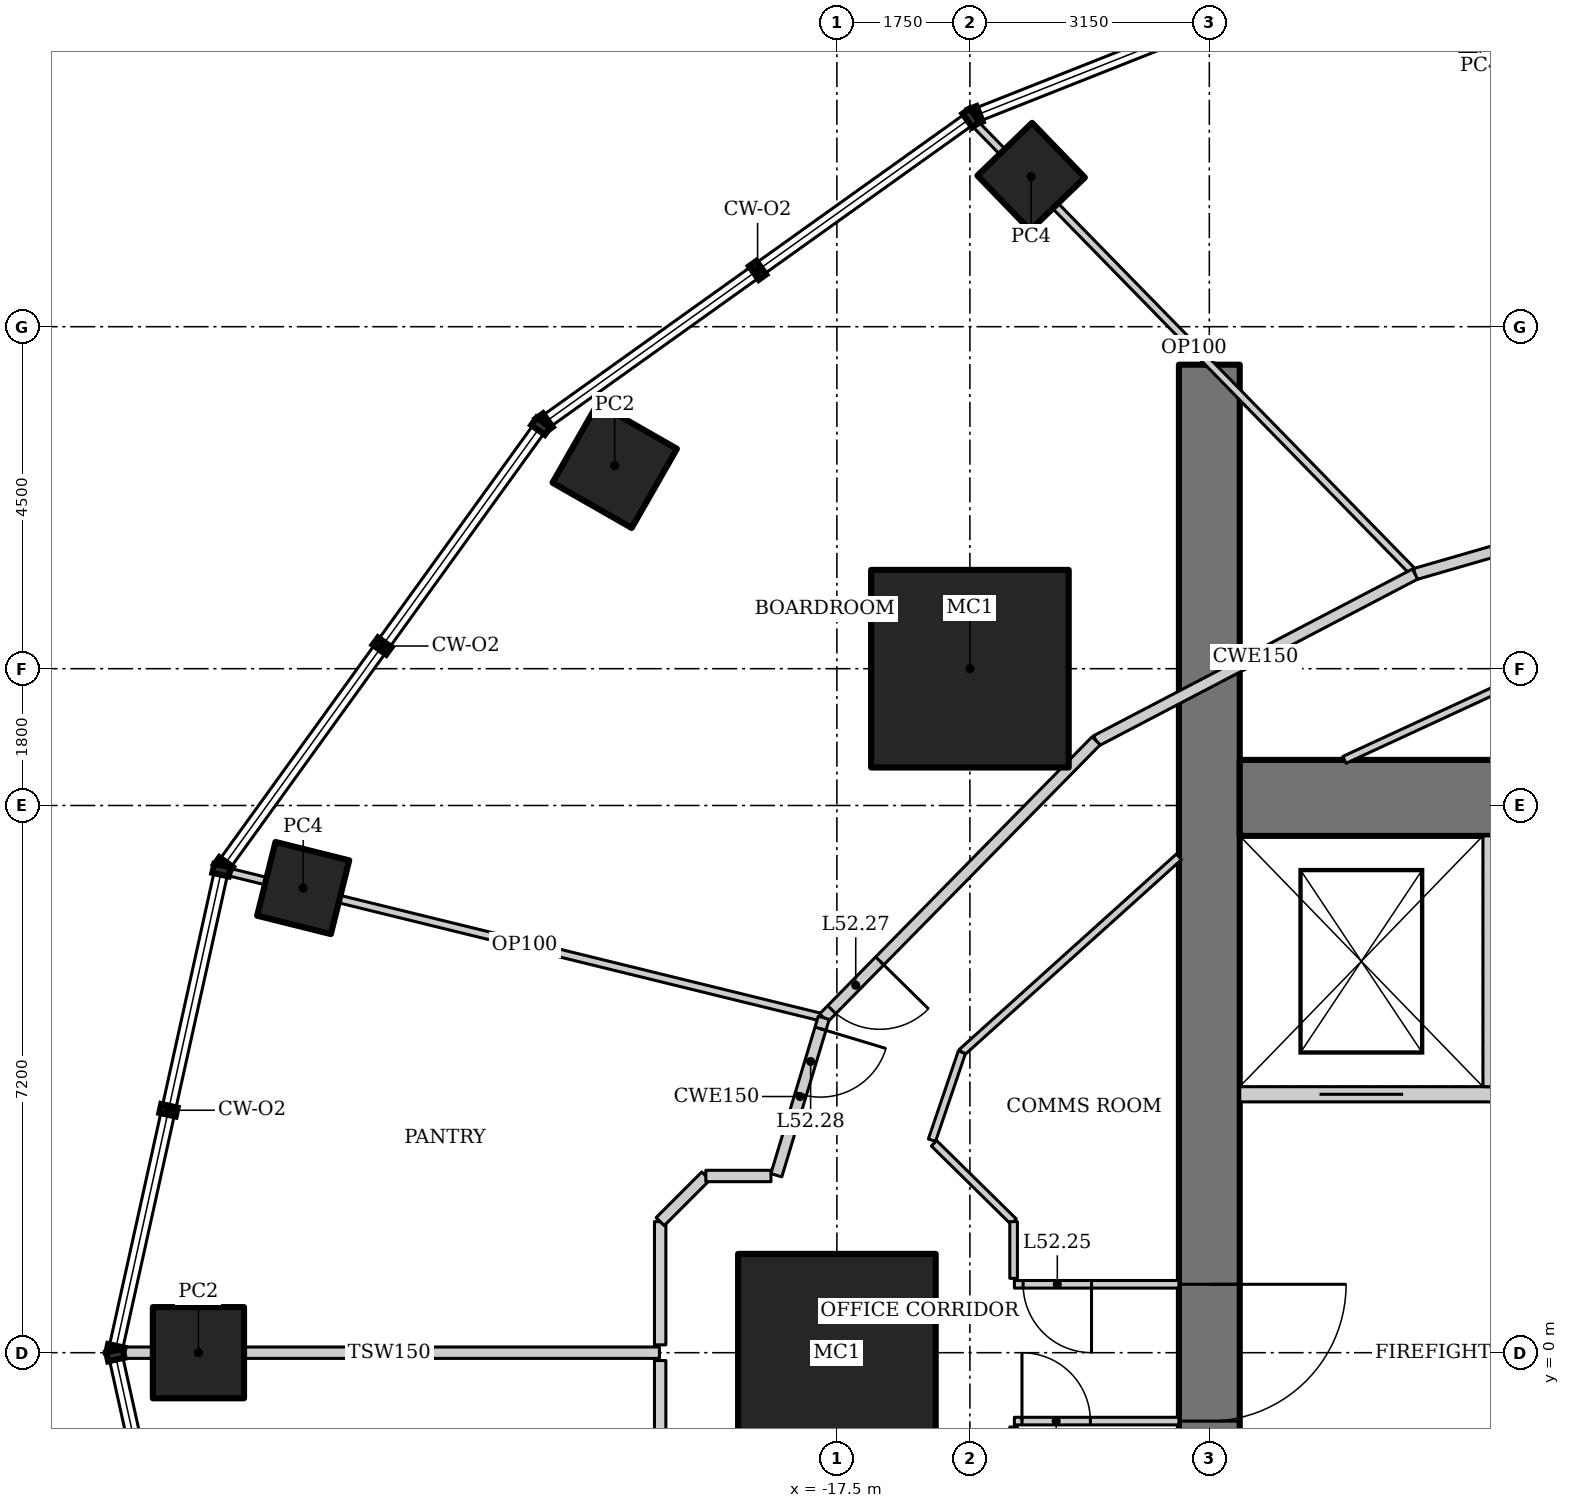
"""IFC4 building model, lengths in metres.
Left out: names, types, materials, properties, quantities, classifications, styles, units other than length and angle.
Written with IfcOpenShell. Run it as: python <this file> out.ifc"""

import sys

from ifc_helpers import new_model, si_unit, direction, frame, frame_2d, origin, origin_2d, place, context, subcontext, project, spatial, rectangle, hollow_rectangle, extrude, element, fill, save


model = new_model("IFC4")
c1 = context("Model", 3, precision=1e-05, world=origin(), true_north=direction((0.0, 1.0)))
c2 = subcontext(c1, "Body", "Model", "MODEL_VIEW")
j1 = project(units=[si_unit("LENGTHUNIT", "METRE"), si_unit("PLANEANGLEUNIT", "RADIAN")], contexts=[c1])
p1 = place(None, origin())
s1 = spatial("IfcSite", under=j1, at=p1, CompositionType="ELEMENT")
p2 = place(p1, origin())
s2 = spatial("IfcBuilding", under=s1, at=p2, CompositionType="ELEMENT")
p3 = place(p2, frame((0.0, 0.0, 224.2)))
s3 = spatial("IfcBuildingStorey", under=s2, at=p3, CompositionType="ELEMENT", Elevation=224.2)
for number, where, z_axis, x_axis in (
    (1, (-15.75, 9.0, 0.0), (0.0, 0.0, 1.0), (1.0, 0.0, 0.0)),
    (2, (-17.5, 0.0, 0.0), (0.0, 0.0, 1.0), (1.0, 0.0, 0.0)),
):
    element("IfcColumn", number, at=place(p3, frame(where, z_axis=z_axis, x_axis=x_axis)), inside=s3, PredefinedType="COLUMN", context=c2, shape_type="SweptSolid", body=[
        extrude(hollow_rectangle(XDim=2.6, YDim=2.6, WallThickness=0.13, at=origin_2d()), origin(), (0.0, 0.0, 1.0), 4.2),
    ])
for number, where, z_axis, x_axis in (
    (3, (-9.035, 17.731, 0.0), (0.0, 0.0, 1.0), (0.891, 0.454, 0.0)),
    (4, (-14.944, 15.475, 0.0), (0.0, 0.0, 1.0), (0.719, 0.695, 0.0)),
):
    element("IfcColumn", number, at=place(p3, frame(where, z_axis=z_axis, x_axis=x_axis)), inside=s3, PredefinedType="COLUMN", context=c2, shape_type="SweptSolid", body=[
        extrude(hollow_rectangle(XDim=1.0, YDim=1.0, WallThickness=0.08, at=origin_2d()), origin(), (0.0, 0.0, 1.0), 4.2),
    ])
p4 = place(p3, frame((-20.423, 11.67, 0.0), z_axis=(0.0, 0.0, 1.0), x_axis=(0.496139221777, 0.86824298017, 0.0)))
e5 = element("IfcColumn", 5, at=p4, inside=s3, PredefinedType="COLUMN", context=c2, shape_type="SweptSolid", body=[
    extrude(hollow_rectangle(XDim=1.2, YDim=1.2, WallThickness=0.1, at=origin_2d()), origin(), (0.0, 0.0, 1.0), 4.2),
])
p5 = place(p3, frame((-24.522, 6.114, 0.0), z_axis=(0.0, 0.0, 1.0), x_axis=(0.2419218956, 0.970295726276, 0.0)))
e6 = element("IfcColumn", 6, at=p5, inside=s3, PredefinedType="COLUMN", context=c2, shape_type="SweptSolid", body=[
    extrude(hollow_rectangle(XDim=1.0, YDim=1.0, WallThickness=0.08, at=origin_2d()), origin(), (0.0, 0.0, 1.0), 4.2),
])
p6 = place(p3, frame((-25.9, 0.0, 0.0), z_axis=(0.0, 0.0, 1.0), x_axis=(1.0, 0.0, 0.0)))
e7 = element("IfcColumn", 7, at=p6, inside=s3, PredefinedType="COLUMN", context=c2, shape_type="SweptSolid", body=[
    extrude(hollow_rectangle(XDim=1.2, YDim=1.2, WallThickness=0.1, at=origin_2d()), origin(), (0.0, 0.0, 1.0), 4.2),
])
p7 = place(p3, frame((-12.6, 13.0, 0.0), z_axis=(0.0, 0.0, 1.0), x_axis=(0.0, -1.0, 0.0)))
e8 = element("IfcWall", 8, at=p7, inside=s3, PredefinedType="SHEAR", context=c2, shape_type="SweptSolid", body=[
    extrude(rectangle(XDim=26.0, YDim=0.8, at=frame_2d((13.0, 0.0))), origin(), (0.0, 0.0, 1.0), 4.2),
])
p8 = place(p7, frame((12.1, 0.0, 0.0)))
e9 = element("IfcOpeningElement", 9, at=p8, cuts=e8, PredefinedType="OPENING", context=c2, shape_type="SweptSolid", body=[
    extrude(rectangle(XDim=1.8, YDim=2.1, at=frame_2d((0.9, 1.05))), frame((0.0, 0.41, 0.0), z_axis=(0.0, -1.0, 0.0), x_axis=(1.0, 0.0, 0.0)), (0.0, 0.0, 1.0), 0.82),
])
p9 = place(p3, frame((-5.6, 7.3, 0.0), z_axis=(0.0, 0.0, 1.0), x_axis=(-1.0, 0.0, 0.0)))
e10 = element("IfcWall", 10, at=p9, inside=s3, PredefinedType="SHEAR", context=c2, shape_type="SweptSolid", body=[
    extrude(rectangle(XDim=6.6, YDim=1.0, at=frame_2d((3.3, 0.0))), origin(), (0.0, 0.0, 1.0), 4.2),
])
p10 = place(p3, frame((-12.2, 3.4, 0.0), z_axis=(0.0, 0.0, 1.0), x_axis=(1.0, 0.0, 0.0)))
e11 = element("IfcWall", 11, at=p10, inside=s3, PredefinedType="SOLIDWALL", context=c2, shape_type="SweptSolid", body=[
    extrude(rectangle(XDim=6.6, YDim=0.2, at=frame_2d((3.3, 0.0))), origin(), (0.0, 0.0, 1.0), 4.2),
])
p11 = place(p10, frame((1.05, 0.0, 0.0)))
e12 = element("IfcOpeningElement", 12, at=p11, cuts=e11, PredefinedType="OPENING", context=c2, shape_type="SweptSolid", body=[
    extrude(rectangle(XDim=1.1, YDim=2.2, at=frame_2d((0.55, 1.1))), frame((0.0, 0.11, 0.0), z_axis=(0.0, -1.0, 0.0), x_axis=(1.0, 0.0, 0.0)), (0.0, 0.0, 1.0), 0.22),
])
p12 = place(p10, frame((4.3, 0.0, 0.0)))
e13 = element("IfcOpeningElement", 13, at=p12, cuts=e11, PredefinedType="OPENING", context=c2, shape_type="SweptSolid", body=[
    extrude(rectangle(XDim=1.4, YDim=2.2, at=frame_2d((0.7, 1.1))), frame((0.0, 0.11, 0.0), z_axis=(0.0, -1.0, 0.0), x_axis=(1.0, 0.0, 0.0)), (0.0, 0.0, 1.0), 0.22),
])
p13 = place(p3, frame((-8.9, 3.5, 0.0), z_axis=(0.0, 0.0, 1.0), x_axis=(0.0, 1.0, 0.0)))
e14 = element("IfcWall", 14, at=p13, inside=s3, PredefinedType="SOLIDWALL", context=c2, shape_type="SweptSolid", body=[
    extrude(rectangle(XDim=3.3, YDim=0.2, at=frame_2d((1.65, 0.0))), origin(), (0.0, 0.0, 1.0), 4.2),
])
p14 = place(p3, frame((-15.709, 16.199, 0.0), z_axis=(0.0, 0.0, 1.0), x_axis=(0.69875697861, -0.715359129978, 0.0)))
e15 = element("IfcWall", 15, at=p14, inside=s3, PredefinedType="PARTITIONING", context=c2, shape_type="SweptSolid", body=[
    extrude(rectangle(XDim=8.323, YDim=0.1, at=frame_2d((4.162, 0.0))), origin(), (0.0, 0.0, 1.0), 3.41),
])
p15 = place(p3, frame((-25.543, 6.336, 0.0), z_axis=(0.0, 0.0, 1.0), x_axis=(0.97123661777, -0.238116425942, 0.0)))
e16 = element("IfcWall", 16, at=p15, inside=s3, PredefinedType="PARTITIONING", context=c2, shape_type="SweptSolid", body=[
    extrude(rectangle(XDim=8.103, YDim=0.1, at=frame_2d((4.052, 0.0))), origin(), (0.0, 0.0, 1.0), 3.108),
])
p16 = place(p3, frame((-5.82, 11.423, 0.0), z_axis=(0.0, 0.0, 1.0), x_axis=(-0.960614838378, -0.27788330696, 0.0)))
e17 = element("IfcWall", 17, at=p16, inside=s3, PredefinedType="PARTITIONING", context=c2, shape_type="SweptSolid", body=[
    extrude(rectangle(XDim=4.24, YDim=0.15, at=frame_2d((2.12, 0.0))), origin(), (0.0, 0.0, 1.0), 4.05),
])
p17 = place(p3, frame((-9.893, 10.245, 0.0), z_axis=(0.0, 0.0, 1.0), x_axis=(-0.886174439647, -0.463351769735, 0.0)))
e18 = element("IfcWall", 18, at=p17, inside=s3, PredefinedType="PARTITIONING", context=c2, shape_type="SweptSolid", body=[
    extrude(rectangle(XDim=4.735, YDim=0.15, at=frame_2d((2.367, 0.0))), origin(), (0.0, 0.0, 1.0), 4.05),
])
p18 = place(p3, frame((-14.089, 8.051, 0.0), z_axis=(0.0, 0.0, 1.0), x_axis=(-0.701111216625, -0.713051934941, 0.0)))
e19 = element("IfcWall", 19, at=p18, inside=s3, PredefinedType="PARTITIONING", context=c2, shape_type="SweptSolid", body=[
    extrude(rectangle(XDim=5.112, YDim=0.15, at=frame_2d((2.556, 0.0))), origin(), (0.0, 0.0, 1.0), 4.05),
])
p19 = place(p18, frame((4.061, 0.0, 0.0)))
e20 = element("IfcOpeningElement", 20, at=p19, cuts=e19, PredefinedType="OPENING", context=c2, shape_type="SweptSolid", body=[
    extrude(rectangle(XDim=0.9, YDim=2.1, at=frame_2d((0.45, 1.05))), frame((0.0, 0.085, 0.0), z_axis=(0.0, -1.0, 0.0), x_axis=(1.0, 0.0, 0.0)), (0.0, 0.0, 1.0), 0.17),
])
p20 = place(p3, frame((-10.823, 7.8, 0.0), z_axis=(0.0, 0.0, 1.0), x_axis=(0.907759689292, 0.419490579748, 0.0)))
e21 = element("IfcWall", 21, at=p20, inside=s3, PredefinedType="PARTITIONING", context=c2, shape_type="SweptSolid", body=[
    extrude(rectangle(XDim=2.506, YDim=0.1, at=frame_2d((1.253, 0.0))), origin(), (0.0, 0.0, 1.0), 4.05),
])
p21 = place(p3, frame((-15.856, 3.953, 0.0), z_axis=(0.0, 0.0, 1.0), x_axis=(0.743177243228, 0.669094601046, 0.0)))
e22 = element("IfcWall", 22, at=p21, inside=s3, PredefinedType="PARTITIONING", context=c2, shape_type="SweptSolid", body=[
    extrude(rectangle(XDim=3.843, YDim=0.1, at=frame_2d((1.921, 0.0))), origin(), (0.0, 0.0, 1.0), 4.05),
])
p22 = place(p3, frame((-26.944, 0.0, 0.0), z_axis=(0.0, 0.0, 1.0), x_axis=(1.0, 0.0, 0.0)))
e23 = element("IfcWall", 23, at=p22, inside=s3, PredefinedType="PARTITIONING", context=c2, shape_type="SweptSolid", body=[
    extrude(rectangle(XDim=7.109, YDim=0.15, at=frame_2d((3.555, 0.0))), origin(), (0.0, 0.0, 1.0), 3.349),
])
p23 = place(p3, frame((-17.673, 4.406, 0.0), z_axis=(0.0, 0.0, 1.0), x_axis=(-0.288362447016, -0.957521330912, 0.0)))
e24 = element("IfcWall", 24, at=p23, inside=s3, PredefinedType="PARTITIONING", context=c2, shape_type="SweptSolid", body=[
    extrude(rectangle(XDim=2.163, YDim=0.15, at=frame_2d((1.082, 0.0))), origin(), (0.0, 0.0, 1.0), 4.05),
])
p24 = place(p23, frame((0.15, 0.0, 0.0)))
e25 = element("IfcOpeningElement", 25, at=p24, cuts=e24, PredefinedType="OPENING", context=c2, shape_type="SweptSolid", body=[
    extrude(rectangle(XDim=0.9, YDim=2.1, at=frame_2d((0.45, 1.05))), frame((0.0, 0.085, 0.0), z_axis=(0.0, -1.0, 0.0), x_axis=(1.0, 0.0, 0.0)), (0.0, 0.0, 1.0), 0.17),
])
p25 = place(p3, frame((-15.165, -0.9, 0.0), z_axis=(0.0, 0.0, 1.0), x_axis=(1.0, 0.0, 0.0)))
e26 = element("IfcWall", 26, at=p25, inside=s3, PredefinedType="PARTITIONING", context=c2, shape_type="SweptSolid", body=[
    extrude(rectangle(XDim=2.165, YDim=0.1, at=frame_2d((1.083, 0.0))), origin(), (0.0, 0.0, 1.0), 4.05),
])
p26 = place(p25, frame((0.1, 0.0, 0.0)))
e27 = element("IfcOpeningElement", 27, at=p26, cuts=e26, PredefinedType="OPENING", context=c2, shape_type="SweptSolid", body=[
    extrude(rectangle(XDim=0.9, YDim=2.1, at=frame_2d((0.45, 1.05))), frame((0.0, 0.06, 0.0), z_axis=(0.0, -1.0, 0.0), x_axis=(1.0, 0.0, 0.0)), (0.0, 0.0, 1.0), 0.12),
])
p27 = place(p3, frame((-13.0, 0.9, 0.0), z_axis=(0.0, 0.0, 1.0), x_axis=(-1.0, 0.0, 0.0)))
e28 = element("IfcWall", 28, at=p27, inside=s3, PredefinedType="PARTITIONING", context=c2, shape_type="SweptSolid", body=[
    extrude(rectangle(XDim=2.165, YDim=0.1, at=frame_2d((1.083, 0.0))), origin(), (0.0, 0.0, 1.0), 4.05),
])
p28 = place(p27, frame((1.15, 0.0, 0.0)))
e29 = element("IfcOpeningElement", 29, at=p28, cuts=e28, PredefinedType="OPENING", context=c2, shape_type="SweptSolid", body=[
    extrude(rectangle(XDim=0.9, YDim=2.1, at=frame_2d((0.45, 1.05))), frame((0.0, 0.06, 0.0), z_axis=(0.0, -1.0, 0.0), x_axis=(1.0, 0.0, 0.0)), (0.0, 0.0, 1.0), 0.12),
])
p29 = place(p3, frame((-16.249, 2.796, 0.0), z_axis=(0.0, 0.0, 1.0), x_axis=(0.321913473529, 0.946769093053, 0.0)))
e30 = element("IfcWall", 30, at=p29, inside=s3, PredefinedType="PARTITIONING", context=c2, shape_type="SweptSolid", body=[
    extrude(rectangle(XDim=1.223, YDim=0.1, at=frame_2d((0.611, 0.0))), origin(), (0.0, 0.0, 1.0), 4.05),
])
p30 = place(p3, frame((-15.175, -0.978, 0.0), z_axis=(0.0, 0.0, 1.0), x_axis=(0.0, -1.0, 0.0)))
e31 = element("IfcWall", 31, at=p30, inside=s3, PredefinedType="PARTITIONING", context=c2, shape_type="SweptSolid", body=[
    extrude(rectangle(XDim=0.746, YDim=0.1, at=frame_2d((0.373, 0.0))), origin(), (0.0, 0.0, 1.0), 4.05),
])
p31 = place(p3, frame((-16.223, 2.755, 0.0), z_axis=(0.0, 0.0, 1.0), x_axis=(0.712897698193, -0.701268045694, 0.0)))
e32 = element("IfcWall", 32, at=p31, inside=s3, PredefinedType="PARTITIONING", context=c2, shape_type="SweptSolid", body=[
    extrude(rectangle(XDim=1.469, YDim=0.1, at=frame_2d((0.735, 0.0))), origin(), (0.0, 0.0, 1.0), 4.05),
])
p32 = place(p3, frame((-15.175, 1.725, 0.0), z_axis=(0.0, 0.0, 1.0), x_axis=(0.0, -1.0, 0.0)))
e33 = element("IfcWall", 33, at=p32, inside=s3, PredefinedType="PARTITIONING", context=c2, shape_type="SweptSolid", body=[
    extrude(rectangle(XDim=0.746, YDim=0.1, at=frame_2d((0.373, 0.0))), origin(), (0.0, 0.0, 1.0), 4.05),
])
p33 = place(p3, frame((-19.825, 0.103, 0.0), z_axis=(0.0, 0.0, 1.0), x_axis=(0.0, 1.0, 0.0)))
e34 = element("IfcWall", 34, at=p33, inside=s3, PredefinedType="PARTITIONING", context=c2, shape_type="SweptSolid", body=[
    extrude(rectangle(XDim=1.621, YDim=0.15, at=frame_2d((0.811, 0.0))), origin(), (0.0, 0.0, 1.0), 4.05),
])
p34 = place(p3, frame((-19.825, 1.725, 0.0), z_axis=(0.0, 0.0, 1.0), x_axis=(0.707106781187, 0.707106781187, 0.0)))
e35 = element("IfcWall", 35, at=p34, inside=s3, PredefinedType="PARTITIONING", context=c2, shape_type="SweptSolid", body=[
    extrude(rectangle(XDim=0.849, YDim=0.15, at=frame_2d((0.425, 0.0))), origin(), (0.0, 0.0, 1.0), 4.05),
])
p35 = place(p3, frame((-19.225, 2.325, 0.0), z_axis=(0.0, 0.0, 1.0), x_axis=(1.0, 0.0, 0.0)))
e36 = element("IfcWall", 36, at=p35, inside=s3, PredefinedType="PARTITIONING", context=c2, shape_type="SweptSolid", body=[
    extrude(rectangle(XDim=0.857, YDim=0.15, at=frame_2d((0.429, 0.0))), origin(), (0.0, 0.0, 1.0), 4.05),
])
p36 = place(p3, frame((-19.825, -1.725, 0.0), z_axis=(0.0, 0.0, 1.0), x_axis=(0.0, 1.0, 0.0)))
e37 = element("IfcWall", 37, at=p36, inside=s3, PredefinedType="PARTITIONING", context=c2, shape_type="SweptSolid", body=[
    extrude(rectangle(XDim=1.621, YDim=0.15, at=frame_2d((0.811, 0.0))), origin(), (0.0, 0.0, 1.0), 4.05),
])
p37 = place(p8, origin())
e38 = element("IfcDoor", 38, at=p37, inside=s3, OperationType="DOUBLE_DOOR_DOUBLE_SWING", PredefinedType="DOOR", context=c2, shape_type="SweptSolid", body=[
    extrude(rectangle(XDim=1.8, YDim=2.1, at=frame_2d((0.9, 1.05))), frame((0.0, 0.025, 0.0), z_axis=(0.0, -1.0, 0.0), x_axis=(1.0, 0.0, 0.0)), (0.0, 0.0, 1.0), 0.05),
])
fill(e9, e38)
p38 = place(p11, origin())
e39 = element("IfcDoor", 39, at=p38, inside=s3, OperationType="DOUBLE_DOOR_SLIDING", PredefinedType="DOOR", context=c2, shape_type="SweptSolid", body=[
    extrude(rectangle(XDim=1.1, YDim=2.2, at=frame_2d((0.55, 1.1))), frame((0.0, 0.025, 0.0), z_axis=(0.0, -1.0, 0.0), x_axis=(1.0, 0.0, 0.0)), (0.0, 0.0, 1.0), 0.05),
])
fill(e12, e39)
p39 = place(p26, origin())
e40 = element("IfcDoor", 40, at=p39, inside=s3, OperationType="SINGLE_SWING_LEFT", PredefinedType="DOOR", context=c2, shape_type="SweptSolid", body=[
    extrude(rectangle(XDim=0.9, YDim=2.1, at=frame_2d((0.45, 1.05))), frame((0.0, 0.025, 0.0), z_axis=(0.0, -1.0, 0.0), x_axis=(1.0, 0.0, 0.0)), (0.0, 0.0, 1.0), 0.05),
])
fill(e27, e40)
p40 = place(p28, origin())
e41 = element("IfcDoor", 41, at=p40, inside=s3, OperationType="SINGLE_SWING_LEFT", PredefinedType="DOOR", context=c2, shape_type="SweptSolid", body=[
    extrude(rectangle(XDim=0.9, YDim=2.1, at=frame_2d((0.45, 1.05))), frame((0.0, 0.025, 0.0), z_axis=(0.0, -1.0, 0.0), x_axis=(1.0, 0.0, 0.0)), (0.0, 0.0, 1.0), 0.05),
])
fill(e29, e41)
p41 = place(p19, origin())
e42 = element("IfcDoor", 42, at=p41, inside=s3, OperationType="SINGLE_SWING_LEFT", PredefinedType="DOOR", context=c2, shape_type="SweptSolid", body=[
    extrude(rectangle(XDim=0.9, YDim=2.1, at=frame_2d((0.45, 1.05))), frame((0.0, 0.025, 0.0), z_axis=(0.0, -1.0, 0.0), x_axis=(1.0, 0.0, 0.0)), (0.0, 0.0, 1.0), 0.05),
])
fill(e20, e42)
p42 = place(p24, origin())
e43 = element("IfcDoor", 43, at=p42, inside=s3, OperationType="SINGLE_SWING_LEFT", PredefinedType="DOOR", context=c2, shape_type="SweptSolid", body=[
    extrude(rectangle(XDim=0.9, YDim=2.1, at=frame_2d((0.45, 1.05))), frame((0.0, 0.025, 0.0), z_axis=(0.0, -1.0, 0.0), x_axis=(1.0, 0.0, 0.0)), (0.0, 0.0, 1.0), 0.05),
])
fill(e25, e43)
save(model, sys.argv[1])
